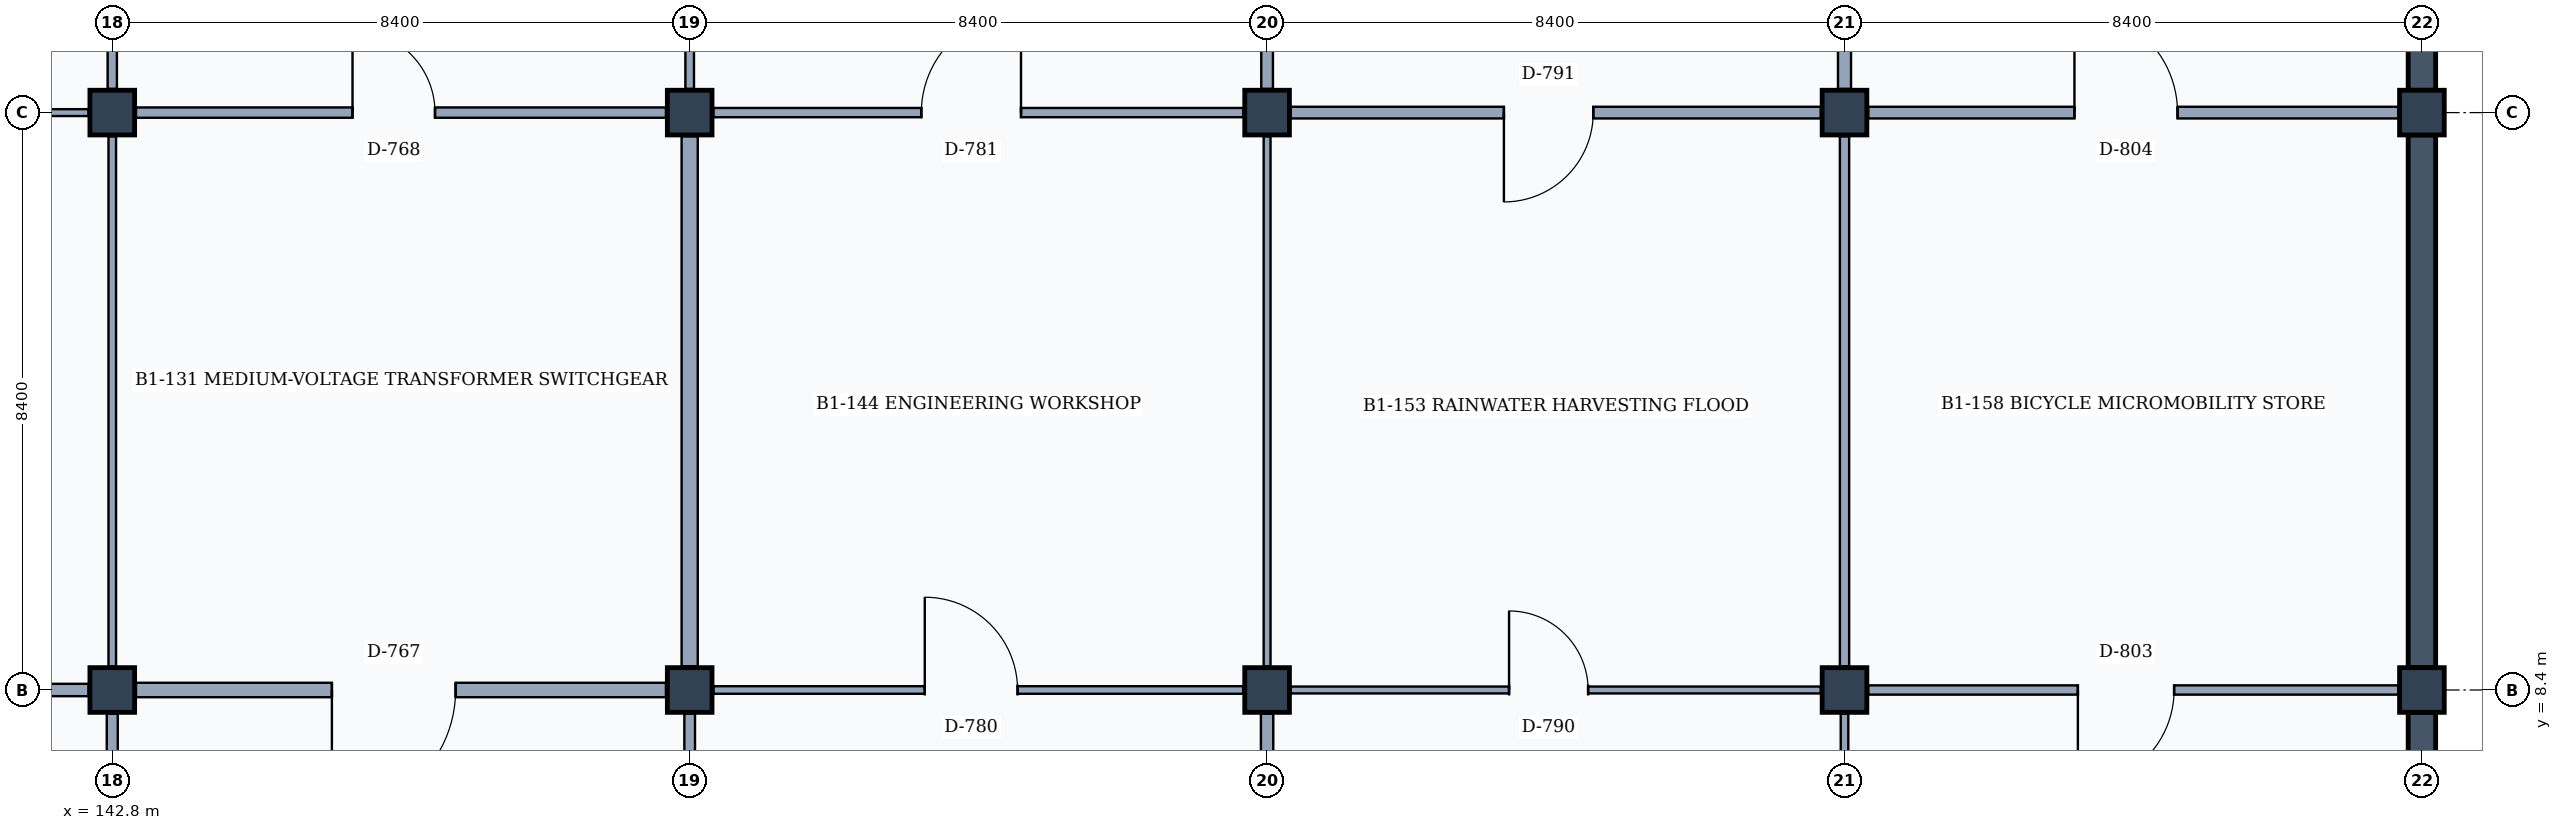
"""IFC4 building model, lengths in metres.
Left out: names, types, materials, properties, quantities, classifications, styles, units other than length and angle.
Written with IfcOpenShell. Run it as: python <this file> out.ifc"""

import sys

from ifc_helpers import new_model, si_unit, direction, frame, frame_2d, origin, origin_2d, place, context, subcontext, project, spatial, rectangle, extrude, element, fill, save


model = new_model("IFC4")
c1 = context("Model", 3, precision=1e-05, world=origin(), true_north=direction((0.0, 1.0)))
c2 = subcontext(c1, "Body", "Model", "MODEL_VIEW")
j1 = project(units=[si_unit("LENGTHUNIT", "METRE"), si_unit("PLANEANGLEUNIT", "RADIAN")], contexts=[c1])
p1 = place(None, origin())
s1 = spatial("IfcSite", under=j1, at=p1, CompositionType="ELEMENT")
p2 = place(p1, origin())
s2 = spatial("IfcBuilding", under=s1, at=p2, CompositionType="ELEMENT")
p3 = place(p2, frame((0.0, 0.0, -4.2)))
s3 = spatial("IfcBuildingStorey", under=s2, at=p3, CompositionType="ELEMENT", Elevation=-4.2)
for number, where, z_axis, x_axis in (
    (1, (142.8, 8.4, 0.0), (0.0, 0.0, 1.0), (1.0, 0.0, 0.0)),
    (2, (142.8, 16.8, 0.0), (0.0, 0.0, 1.0), (1.0, 0.0, 0.0)),
    (3, (151.2, 8.4, 0.0), (0.0, 0.0, 1.0), (1.0, 0.0, 0.0)),
    (4, (151.2, 16.8, 0.0), (0.0, 0.0, 1.0), (1.0, 0.0, 0.0)),
    (5, (159.6, 8.4, 0.0), (0.0, 0.0, 1.0), (1.0, 0.0, 0.0)),
    (6, (159.6, 16.8, 0.0), (0.0, 0.0, 1.0), (1.0, 0.0, 0.0)),
    (7, (168.0, 8.4, 0.0), (0.0, 0.0, 1.0), (1.0, 0.0, 0.0)),
    (8, (168.0, 16.8, 0.0), (0.0, 0.0, 1.0), (1.0, 0.0, 0.0)),
    (9, (176.4, 8.4, 0.0), (0.0, 0.0, 1.0), (1.0, 0.0, 0.0)),
    (10, (176.4, 16.8, 0.0), (0.0, 0.0, 1.0), (1.0, 0.0, 0.0)),
):
    element("IfcColumn", number, at=place(p3, frame(where, z_axis=z_axis, x_axis=x_axis)), inside=s3, PredefinedType="COLUMN", context=c2, shape_type="SweptSolid", body=[
        extrude(rectangle(XDim=0.65, YDim=0.65, at=origin_2d()), origin(), (0.0, 0.0, 1.0), 4.2),
    ])
p4 = place(p3, frame((176.4, 8.075, 0.0), z_axis=(0.0, 0.0, 1.0), x_axis=(0.0, -1.0, 0.0)))
e11 = element("IfcWall", 11, at=p4, inside=s3, PredefinedType="STANDARD", context=c2, shape_type="SweptSolid", body=[
    extrude(rectangle(XDim=7.8, YDim=0.4, at=frame_2d((3.9, 0.0))), origin(), (0.0, 0.0, 1.0), 3.88),
])
for number, where, z_axis, x_axis in (
    (12, (176.4, 16.475, 0.0), (0.0, 0.0, 1.0), (0.0, -1.0, 0.0)),
    (13, (176.4, 24.875, 0.0), (0.0, 0.0, 1.0), (0.0, -1.0, 0.0)),
):
    element("IfcWall", number, at=place(p3, frame(where, z_axis=z_axis, x_axis=x_axis)), inside=s3, PredefinedType="STANDARD", context=c2, shape_type="SweptSolid", body=[
        extrude(rectangle(XDim=7.75, YDim=0.4, at=frame_2d((3.875, 0.0))), origin(), (0.0, 0.0, 1.0), 3.88),
    ])
p5 = place(p3, frame((142.8, 0.295, 0.0), z_axis=(0.0, 0.0, 1.0), x_axis=(0.0, 1.0, 0.0)))
e14 = element("IfcWall", 14, at=p5, inside=s3, PredefinedType="PARTITIONING", context=c2, shape_type="SweptSolid", body=[
    extrude(rectangle(XDim=7.76, YDim=0.16, at=frame_2d((3.88, 0.0))), origin(), (0.0, 0.0, 1.0), 3.1),
])
p6 = place(p3, frame((134.745, 8.4, 0.0), z_axis=(0.0, 0.0, 1.0), x_axis=(1.0, 0.0, 0.0)))
e15 = element("IfcWall", 15, at=p6, inside=s3, PredefinedType="PARTITIONING", context=c2, shape_type="SweptSolid", body=[
    extrude(rectangle(XDim=7.71, YDim=0.18, at=frame_2d((3.855, 0.0))), origin(), (0.0, 0.0, 1.0), 3.05),
])
p7 = place(p6, frame((2.925, 0.0, 0.0)))
e16 = element("IfcOpeningElement", 16, at=p7, cuts=e15, PredefinedType="OPENING", context=c2, shape_type="SweptSolid", body=[
    extrude(rectangle(XDim=1.65, YDim=2.25, at=frame_2d((0.825, 1.125))), frame((0.0, 0.1, 0.0), z_axis=(0.0, -1.0, 0.0), x_axis=(1.0, 0.0, 0.0)), (0.0, 0.0, 1.0), 0.2),
])
p8 = place(p3, frame((142.8, 8.745, 0.0), z_axis=(0.0, 0.0, 1.0), x_axis=(0.0, 1.0, 0.0)))
e17 = element("IfcWall", 17, at=p8, inside=s3, PredefinedType="PARTITIONING", context=c2, shape_type="SweptSolid", body=[
    extrude(rectangle(XDim=7.71, YDim=0.11, at=frame_2d((3.855, 0.0))), origin(), (0.0, 0.0, 1.0), 3.1),
])
p9 = place(p3, frame((134.745, 16.8, 0.0), z_axis=(0.0, 0.0, 1.0), x_axis=(1.0, 0.0, 0.0)))
e18 = element("IfcWall", 18, at=p9, inside=s3, PredefinedType="MOVABLE", context=c2, shape_type="SweptSolid", body=[
    extrude(rectangle(XDim=7.71, YDim=0.1, at=frame_2d((3.855, 0.0))), origin(), (0.0, 0.0, 1.0), 3.05),
])
p10 = place(p9, frame((3.225, 0.0, 0.0)))
e19 = element("IfcOpeningElement", 19, at=p10, cuts=e18, PredefinedType="OPENING", context=c2, shape_type="SweptSolid", body=[
    extrude(rectangle(XDim=1.05, YDim=2.2, at=frame_2d((0.525, 1.1))), frame((0.0, 0.06, 0.0), z_axis=(0.0, -1.0, 0.0), x_axis=(1.0, 0.0, 0.0)), (0.0, 0.0, 1.0), 0.12),
])
p11 = place(p3, frame((142.8, 17.145, 0.0), z_axis=(0.0, 0.0, 1.0), x_axis=(0.0, 1.0, 0.0)))
e20 = element("IfcWall", 20, at=p11, inside=s3, PredefinedType="PARTITIONING", context=c2, shape_type="SweptSolid", body=[
    extrude(rectangle(XDim=7.71, YDim=0.135, at=frame_2d((3.855, 0.0))), origin(), (0.0, 0.0, 1.0), 3.1),
])
p12 = place(p3, frame((151.2, 0.295, 0.0), z_axis=(0.0, 0.0, 1.0), x_axis=(0.0, 1.0, 0.0)))
e21 = element("IfcWall", 21, at=p12, inside=s3, PredefinedType="PARTITIONING", context=c2, shape_type="SweptSolid", body=[
    extrude(rectangle(XDim=7.76, YDim=0.155, at=frame_2d((3.88, 0.0))), origin(), (0.0, 0.0, 1.0), 3.1),
])
p13 = place(p3, frame((143.145, 8.4, 0.0), z_axis=(0.0, 0.0, 1.0), x_axis=(1.0, 0.0, 0.0)))
e22 = element("IfcWall", 22, at=p13, inside=s3, PredefinedType="PARTITIONING", context=c2, shape_type="SweptSolid", body=[
    extrude(rectangle(XDim=7.71, YDim=0.21, at=frame_2d((3.855, 0.0))), origin(), (0.0, 0.0, 1.0), 3.05),
])
p14 = place(p13, frame((2.85, 0.0, 0.0)))
e23 = element("IfcOpeningElement", 23, at=p14, cuts=e22, PredefinedType="OPENING", context=c2, shape_type="SweptSolid", body=[
    extrude(rectangle(XDim=1.8, YDim=2.3, at=frame_2d((0.9, 1.15))), frame((0.0, 0.115, 0.0), z_axis=(0.0, -1.0, 0.0), x_axis=(1.0, 0.0, 0.0)), (0.0, 0.0, 1.0), 0.23),
])
p15 = place(p3, frame((151.2, 8.745, 0.0), z_axis=(0.0, 0.0, 1.0), x_axis=(0.0, 1.0, 0.0)))
e24 = element("IfcWall", 24, at=p15, inside=s3, PredefinedType="PARTITIONING", context=c2, shape_type="SweptSolid", body=[
    extrude(rectangle(XDim=7.71, YDim=0.235, at=frame_2d((3.855, 0.0))), origin(), (0.0, 0.0, 1.0), 3.1),
])
p16 = place(p3, frame((143.145, 16.8, 0.0), z_axis=(0.0, 0.0, 1.0), x_axis=(1.0, 0.0, 0.0)))
e25 = element("IfcWall", 25, at=p16, inside=s3, PredefinedType="PARTITIONING", context=c2, shape_type="SweptSolid", body=[
    extrude(rectangle(XDim=7.71, YDim=0.15, at=frame_2d((3.855, 0.0))), origin(), (0.0, 0.0, 1.0), 3.05),
])
p17 = place(p16, frame((3.15, 0.0, 0.0)))
e26 = element("IfcOpeningElement", 26, at=p17, cuts=e25, PredefinedType="OPENING", context=c2, shape_type="SweptSolid", body=[
    extrude(rectangle(XDim=1.2, YDim=2.2, at=frame_2d((0.6, 1.1))), frame((0.0, 0.085, 0.0), z_axis=(0.0, -1.0, 0.0), x_axis=(1.0, 0.0, 0.0)), (0.0, 0.0, 1.0), 0.17),
])
p18 = place(p3, frame((151.2, 17.145, 0.0), z_axis=(0.0, 0.0, 1.0), x_axis=(0.0, 1.0, 0.0)))
e27 = element("IfcWall", 27, at=p18, inside=s3, PredefinedType="PARTITIONING", context=c2, shape_type="SweptSolid", body=[
    extrude(rectangle(XDim=7.61, YDim=0.125, at=frame_2d((3.805, 0.0))), origin(), (0.0, 0.0, 1.0), 3.1),
])
p19 = place(p3, frame((159.6, 0.295, 0.0), z_axis=(0.0, 0.0, 1.0), x_axis=(0.0, 1.0, 0.0)))
e28 = element("IfcWall", 28, at=p19, inside=s3, PredefinedType="PARTITIONING", context=c2, shape_type="SweptSolid", body=[
    extrude(rectangle(XDim=7.76, YDim=0.18, at=frame_2d((3.88, 0.0))), origin(), (0.0, 0.0, 1.0), 3.1),
])
p20 = place(p3, frame((151.545, 8.4, 0.0), z_axis=(0.0, 0.0, 1.0), x_axis=(1.0, 0.0, 0.0)))
e29 = element("IfcWall", 29, at=p20, inside=s3, PredefinedType="PARTITIONING", context=c2, shape_type="SweptSolid", body=[
    extrude(rectangle(XDim=7.71, YDim=0.11, at=frame_2d((3.855, 0.0))), origin(), (0.0, 0.0, 1.0), 3.05),
])
p21 = place(p20, frame((3.075, 0.0, 0.0)))
e30 = element("IfcOpeningElement", 30, at=p21, cuts=e29, PredefinedType="OPENING", context=c2, shape_type="SweptSolid", body=[
    extrude(rectangle(XDim=1.35, YDim=2.25, at=frame_2d((0.675, 1.125))), frame((0.0, 0.065, 0.0), z_axis=(0.0, -1.0, 0.0), x_axis=(1.0, 0.0, 0.0)), (0.0, 0.0, 1.0), 0.13),
])
p22 = place(p3, frame((159.6, 8.745, 0.0), z_axis=(0.0, 0.0, 1.0), x_axis=(0.0, 1.0, 0.0)))
e31 = element("IfcWall", 31, at=p22, inside=s3, PredefinedType="MOVABLE", context=c2, shape_type="SweptSolid", body=[
    extrude(rectangle(XDim=7.71, YDim=0.1, at=frame_2d((3.855, 0.0))), origin(), (0.0, 0.0, 1.0), 3.1),
])
p23 = place(p3, frame((151.545, 16.8, 0.0), z_axis=(0.0, 0.0, 1.0), x_axis=(1.0, 0.0, 0.0)))
e32 = element("IfcWall", 32, at=p23, inside=s3, PredefinedType="PARTITIONING", context=c2, shape_type="SweptSolid", body=[
    extrude(rectangle(XDim=7.71, YDim=0.135, at=frame_2d((3.855, 0.0))), origin(), (0.0, 0.0, 1.0), 3.05),
])
p24 = place(p23, frame((3.025, 0.0, 0.0)))
e33 = element("IfcOpeningElement", 33, at=p24, cuts=e32, PredefinedType="OPENING", context=c2, shape_type="SweptSolid", body=[
    extrude(rectangle(XDim=1.45, YDim=2.35, at=frame_2d((0.725, 1.175))), frame((0.0, 0.077, 0.0), z_axis=(0.0, -1.0, 0.0), x_axis=(1.0, 0.0, 0.0)), (0.0, 0.0, 1.0), 0.155),
])
p25 = place(p3, frame((159.6, 17.145, 0.0), z_axis=(0.0, 0.0, 1.0), x_axis=(0.0, 1.0, 0.0)))
e34 = element("IfcWall", 34, at=p25, inside=s3, PredefinedType="PARTITIONING", context=c2, shape_type="SweptSolid", body=[
    extrude(rectangle(XDim=7.61, YDim=0.17, at=frame_2d((3.805, 0.0))), origin(), (0.0, 0.0, 1.0), 3.1),
])
p26 = place(p25, frame((3.25, 0.0, 0.0)))
e35 = element("IfcOpeningElement", 35, at=p26, cuts=e34, PredefinedType="OPENING", context=c2, shape_type="SweptSolid", body=[
    extrude(rectangle(XDim=1.0, YDim=2.15, at=frame_2d((0.5, 1.075))), frame((0.0, 0.095, 0.0), z_axis=(0.0, -1.0, 0.0), x_axis=(1.0, 0.0, 0.0)), (0.0, 0.0, 1.0), 0.19),
])
p27 = place(p3, frame((168.0, 0.295, 0.0), z_axis=(0.0, 0.0, 1.0), x_axis=(0.0, 1.0, 0.0)))
e36 = element("IfcWall", 36, at=p27, inside=s3, PredefinedType="PARTITIONING", context=c2, shape_type="SweptSolid", body=[
    extrude(rectangle(XDim=7.76, YDim=0.11, at=frame_2d((3.88, 0.0))), origin(), (0.0, 0.0, 1.0), 3.1),
])
p28 = place(p3, frame((159.945, 8.4, 0.0), z_axis=(0.0, 0.0, 1.0), x_axis=(1.0, 0.0, 0.0)))
e37 = element("IfcWall", 37, at=p28, inside=s3, PredefinedType="MOVABLE", context=c2, shape_type="SweptSolid", body=[
    extrude(rectangle(XDim=7.71, YDim=0.1, at=frame_2d((3.855, 0.0))), origin(), (0.0, 0.0, 1.0), 3.05),
])
p29 = place(p28, frame((3.175, 0.0, 0.0)))
e38 = element("IfcOpeningElement", 38, at=p29, cuts=e37, PredefinedType="OPENING", context=c2, shape_type="SweptSolid", body=[
    extrude(rectangle(XDim=1.15, YDim=2.25, at=frame_2d((0.575, 1.125))), frame((0.0, 0.06, 0.0), z_axis=(0.0, -1.0, 0.0), x_axis=(1.0, 0.0, 0.0)), (0.0, 0.0, 1.0), 0.12),
])
p30 = place(p3, frame((168.0, 8.745, 0.0), z_axis=(0.0, 0.0, 1.0), x_axis=(0.0, 1.0, 0.0)))
e39 = element("IfcWall", 39, at=p30, inside=s3, PredefinedType="PARTITIONING", context=c2, shape_type="SweptSolid", body=[
    extrude(rectangle(XDim=7.71, YDim=0.135, at=frame_2d((3.855, 0.0))), origin(), (0.0, 0.0, 1.0), 3.1),
])
p31 = place(p3, frame((159.945, 16.8, 0.0), z_axis=(0.0, 0.0, 1.0), x_axis=(1.0, 0.0, 0.0)))
e40 = element("IfcWall", 40, at=p31, inside=s3, PredefinedType="PARTITIONING", context=c2, shape_type="SweptSolid", body=[
    extrude(rectangle(XDim=7.71, YDim=0.17, at=frame_2d((3.855, 0.0))), origin(), (0.0, 0.0, 1.0), 3.05),
])
p32 = place(p31, frame((3.1, 0.0, 0.0)))
e41 = element("IfcOpeningElement", 41, at=p32, cuts=e40, PredefinedType="OPENING", context=c2, shape_type="SweptSolid", body=[
    extrude(rectangle(XDim=1.3, YDim=2.2, at=frame_2d((0.65, 1.1))), frame((0.0, 0.095, 0.0), z_axis=(0.0, -1.0, 0.0), x_axis=(1.0, 0.0, 0.0)), (0.0, 0.0, 1.0), 0.19),
])
p33 = place(p3, frame((168.0, 17.145, 0.0), z_axis=(0.0, 0.0, 1.0), x_axis=(0.0, 1.0, 0.0)))
e42 = element("IfcWall", 42, at=p33, inside=s3, PredefinedType="PARTITIONING", context=c2, shape_type="SweptSolid", body=[
    extrude(rectangle(XDim=7.71, YDim=0.19, at=frame_2d((3.855, 0.0))), origin(), (0.0, 0.0, 1.0), 3.1),
])
p34 = place(p3, frame((168.345, 8.4, 0.0), z_axis=(0.0, 0.0, 1.0), x_axis=(1.0, 0.0, 0.0)))
e43 = element("IfcWall", 43, at=p34, inside=s3, PredefinedType="PARTITIONING", context=c2, shape_type="SweptSolid", body=[
    extrude(rectangle(XDim=7.71, YDim=0.135, at=frame_2d((3.855, 0.0))), origin(), (0.0, 0.0, 1.0), 3.05),
])
p35 = place(p34, frame((3.05, 0.0, 0.0)))
e44 = element("IfcOpeningElement", 44, at=p35, cuts=e43, PredefinedType="OPENING", context=c2, shape_type="SweptSolid", body=[
    extrude(rectangle(XDim=1.4, YDim=2.25, at=frame_2d((0.7, 1.125))), frame((0.0, 0.077, 0.0), z_axis=(0.0, -1.0, 0.0), x_axis=(1.0, 0.0, 0.0)), (0.0, 0.0, 1.0), 0.155),
])
p36 = place(p3, frame((168.345, 16.8, 0.0), z_axis=(0.0, 0.0, 1.0), x_axis=(1.0, 0.0, 0.0)))
e45 = element("IfcWall", 45, at=p36, inside=s3, PredefinedType="PARTITIONING", context=c2, shape_type="SweptSolid", body=[
    extrude(rectangle(XDim=7.71, YDim=0.17, at=frame_2d((3.855, 0.0))), origin(), (0.0, 0.0, 1.0), 3.05),
])
p37 = place(p36, frame((3.0, 0.0, 0.0)))
e46 = element("IfcOpeningElement", 46, at=p37, cuts=e45, PredefinedType="OPENING", context=c2, shape_type="SweptSolid", body=[
    extrude(rectangle(XDim=1.5, YDim=2.3, at=frame_2d((0.75, 1.15))), frame((0.0, 0.095, 0.0), z_axis=(0.0, -1.0, 0.0), x_axis=(1.0, 0.0, 0.0)), (0.0, 0.0, 1.0), 0.19),
])
p38 = place(p14, frame((1.8, 0.0, 0.0), z_axis=(0.0, 0.0, 1.0), x_axis=(-1.0, 0.0, 0.0)))
e47 = element("IfcDoor", 47, at=p38, inside=s3, OperationType="SINGLE_SWING_RIGHT", PredefinedType="DOOR", context=c2, shape_type="SweptSolid", body=[
    extrude(rectangle(XDim=1.8, YDim=2.3, at=frame_2d((0.9, 1.15))), frame((0.0, 0.025, 0.0), z_axis=(0.0, -1.0, 0.0), x_axis=(1.0, 0.0, 0.0)), (0.0, 0.0, 1.0), 0.05),
])
fill(e23, e47)
p39 = place(p17, origin())
e48 = element("IfcDoor", 48, at=p39, inside=s3, OperationType="SINGLE_SWING_LEFT", PredefinedType="DOOR", context=c2, shape_type="SweptSolid", body=[
    extrude(rectangle(XDim=1.2, YDim=2.2, at=frame_2d((0.6, 1.1))), frame((0.0, 0.025, 0.0), z_axis=(0.0, -1.0, 0.0), x_axis=(1.0, 0.0, 0.0)), (0.0, 0.0, 1.0), 0.05),
])
fill(e26, e48)
p40 = place(p21, origin())
e49 = element("IfcDoor", 49, at=p40, inside=s3, OperationType="SINGLE_SWING_LEFT", PredefinedType="DOOR", context=c2, shape_type="SweptSolid", body=[
    extrude(rectangle(XDim=1.35, YDim=2.25, at=frame_2d((0.675, 1.125))), frame((0.0, 0.025, 0.0), z_axis=(0.0, -1.0, 0.0), x_axis=(1.0, 0.0, 0.0)), (0.0, 0.0, 1.0), 0.05),
])
fill(e30, e49)
p41 = place(p24, origin())
e50 = element("IfcDoor", 50, at=p41, inside=s3, OperationType="SINGLE_SWING_RIGHT", PredefinedType="DOOR", context=c2, shape_type="SweptSolid", body=[
    extrude(rectangle(XDim=1.45, YDim=2.35, at=frame_2d((0.725, 1.175))), frame((0.0, 0.025, 0.0), z_axis=(0.0, -1.0, 0.0), x_axis=(1.0, 0.0, 0.0)), (0.0, 0.0, 1.0), 0.05),
])
fill(e33, e50)
p42 = place(p29, origin())
e51 = element("IfcDoor", 51, at=p42, inside=s3, OperationType="SINGLE_SWING_LEFT", PredefinedType="DOOR", context=c2, shape_type="SweptSolid", body=[
    extrude(rectangle(XDim=1.15, YDim=2.25, at=frame_2d((0.575, 1.125))), frame((0.0, 0.025, 0.0), z_axis=(0.0, -1.0, 0.0), x_axis=(1.0, 0.0, 0.0)), (0.0, 0.0, 1.0), 0.05),
])
fill(e38, e51)
p43 = place(p32, frame((1.3, 0.0, 0.0), z_axis=(0.0, 0.0, 1.0), x_axis=(-1.0, 0.0, 0.0)))
e52 = element("IfcDoor", 52, at=p43, inside=s3, OperationType="SINGLE_SWING_RIGHT", PredefinedType="DOOR", context=c2, shape_type="SweptSolid", body=[
    extrude(rectangle(XDim=1.3, YDim=2.2, at=frame_2d((0.65, 1.1))), frame((0.0, 0.025, 0.0), z_axis=(0.0, -1.0, 0.0), x_axis=(1.0, 0.0, 0.0)), (0.0, 0.0, 1.0), 0.05),
])
fill(e41, e52)
p44 = place(p35, frame((1.4, 0.0, 0.0), z_axis=(0.0, 0.0, 1.0), x_axis=(-1.0, 0.0, 0.0)))
e53 = element("IfcDoor", 53, at=p44, inside=s3, OperationType="SINGLE_SWING_RIGHT", PredefinedType="DOOR", context=c2, shape_type="SweptSolid", body=[
    extrude(rectangle(XDim=1.4, YDim=2.25, at=frame_2d((0.7, 1.125))), frame((0.0, 0.025, 0.0), z_axis=(0.0, -1.0, 0.0), x_axis=(1.0, 0.0, 0.0)), (0.0, 0.0, 1.0), 0.05),
])
fill(e44, e53)
p45 = place(p37, origin())
e54 = element("IfcDoor", 54, at=p45, inside=s3, OperationType="SINGLE_SWING_LEFT", PredefinedType="DOOR", context=c2, shape_type="SweptSolid", body=[
    extrude(rectangle(XDim=1.5, YDim=2.3, at=frame_2d((0.75, 1.15))), frame((0.0, 0.025, 0.0), z_axis=(0.0, -1.0, 0.0), x_axis=(1.0, 0.0, 0.0)), (0.0, 0.0, 1.0), 0.05),
])
fill(e46, e54)
save(model, sys.argv[1])
